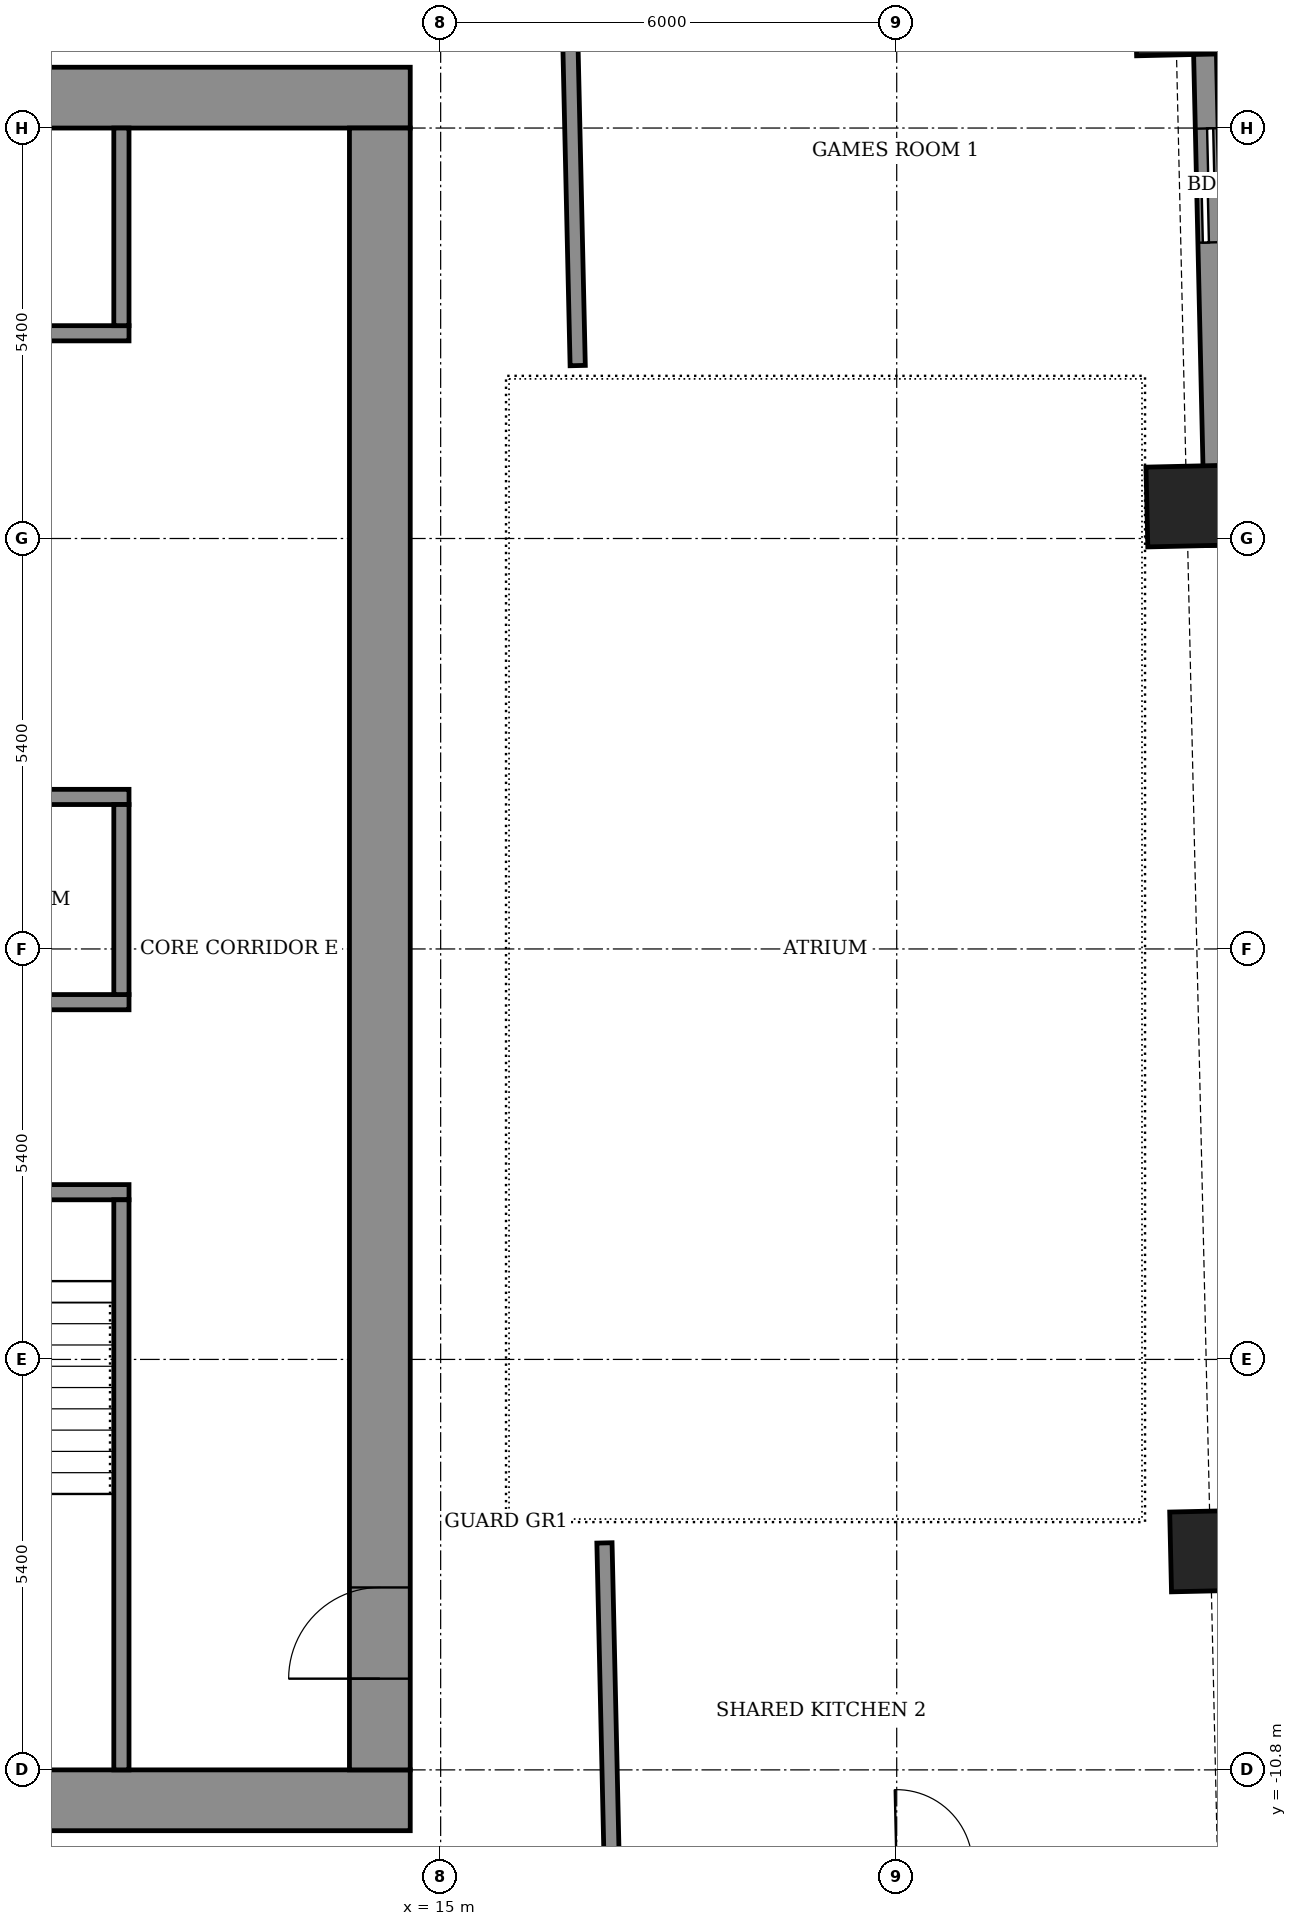
"""IFC4 building model, lengths in metres.
Left out: names, types, materials, properties, quantities, classifications, styles, units other than length and angle.
Written with IfcOpenShell. Run it as: python <this file> out.ifc"""

import sys

from ifc_helpers import new_model, si_unit, direction, frame, frame_2d, origin, origin_2d, place, context, subcontext, project, spatial, rectangle, extrude, element, fill, save


model = new_model("IFC4")
c1 = context("Model", 3, precision=1e-05, world=origin(), true_north=direction((0.0, 1.0)))
c2 = subcontext(c1, "Body", "Model", "MODEL_VIEW")
j1 = project(units=[si_unit("LENGTHUNIT", "METRE"), si_unit("PLANEANGLEUNIT", "RADIAN")], contexts=[c1])
p1 = place(None, origin())
s1 = spatial("IfcSite", under=j1, at=p1, CompositionType="ELEMENT")
p2 = place(p1, origin())
s2 = spatial("IfcBuilding", under=s1, at=p2, CompositionType="ELEMENT")
p3 = place(p2, frame((0.0, 0.0, 245.5)))
s3 = spatial("IfcBuildingStorey", under=s2, at=p3, CompositionType="ELEMENT", Elevation=245.5)
for number, where, z_axis, x_axis in (
    (1, (25.128, -7.921, -0.55), (0.0, 0.0, 1.0), (-0.023, 1.0, 0.0)),
    (2, (24.816, 5.826, -0.55), (0.0, 0.0, 1.0), (-0.023, 1.0, 0.0)),
    (3, (24.669, 12.287, -0.55), (0.0, 0.0, 1.0), (-0.023, 1.0, 0.0)),
):
    element("IfcColumn", number, at=place(p3, frame(where, z_axis=z_axis, x_axis=x_axis)), inside=s3, PredefinedType="COLUMN", context=c2, shape_type="SweptSolid", body=[
        extrude(rectangle(XDim=1.05, YDim=1.05, at=origin_2d()), origin(), (0.0, 0.0, 1.0), 3.6),
    ])
p4 = place(p3, frame((25.203, 5.31, 0.0), z_axis=(0.0, 0.0, 1.0), x_axis=(-0.022708061432, 0.999742138727, 0.0)))
e4 = element("IfcWall", 4, at=p4, inside=s3, PredefinedType="SOLIDWALL", context=c2, shape_type="SweptSolid", body=[
    extrude(rectangle(XDim=13.299, YDim=0.3, at=frame_2d((6.65, 0.0))), origin(), (0.0, 0.0, 1.0), 2.55),
])
p5 = place(p4, frame((3.986, 0.0, 0.0)))
e5 = element("IfcOpeningElement", 5, at=p5, cuts=e4, PredefinedType="OPENING", context=c2, shape_type="SweptSolid", body=[
    extrude(rectangle(XDim=1.5, YDim=2.4, at=frame_2d((0.75, 1.2))), frame((0.0, 0.16, 0.0), z_axis=(0.0, -1.0, 0.0), x_axis=(1.0, 0.0, 0.0)), (0.0, 0.0, 1.0), 0.32),
])
p6 = place(p4, frame((9.013, 0.0, 0.9)))
e6 = element("IfcOpeningElement", 6, at=p6, cuts=e4, PredefinedType="OPENING", context=c2, shape_type="SweptSolid", body=[
    extrude(rectangle(XDim=2.4, YDim=1.5, at=frame_2d((1.2, 0.75))), frame((0.0, 0.16, 0.0), z_axis=(0.0, -1.0, 0.0), x_axis=(1.0, 0.0, 0.0)), (0.0, 0.0, 1.0), 0.32),
])
p7 = place(p3, frame((17.253, -12.149, 0.0), z_axis=(0.0, 0.0, 1.0), x_axis=(-0.022578158225, 0.999745080894, 0.0)))
e7 = element("IfcWall", 7, at=p7, inside=s3, PredefinedType="PARTITIONING", context=c2, shape_type="SweptSolid", body=[
    extrude(rectangle(XDim=4.336, YDim=0.2, at=frame_2d((2.168, 0.0))), origin(), (0.0, 0.0, 1.0), 3.05),
])
p8 = place(p3, frame((16.803, 7.675, 0.0), z_axis=(0.0, 0.0, 1.0), x_axis=(-0.022667483124, 0.999743059595, 0.0)))
e8 = element("IfcWall", 8, at=p8, inside=s3, PredefinedType="PARTITIONING", context=c2, shape_type="SweptSolid", body=[
    extrude(rectangle(XDim=5.245, YDim=0.2, at=frame_2d((2.623, 0.0))), origin(), (0.0, 0.0, 1.0), 3.05),
])
for number, where, z_axis, x_axis in (
    (9, (-14.6, -11.2, 0.0), (0.0, 0.0, 1.0), (1.0, 0.0, 0.0)),
    (10, (-14.6, 11.2, 0.0), (0.0, 0.0, 1.0), (1.0, 0.0, 0.0)),
):
    element("IfcWall", number, at=place(p3, frame(where, z_axis=z_axis, x_axis=x_axis)), inside=s3, PredefinedType="SHEAR", context=c2, shape_type="SweptSolid", body=[
        extrude(rectangle(XDim=29.2, YDim=0.8, at=frame_2d((14.6, 0.0))), origin(), (0.0, 0.0, 1.0), 3.6),
    ])
p9 = place(p3, frame((14.2, -10.8, 0.0), z_axis=(0.0, 0.0, 1.0), x_axis=(0.0, 1.0, 0.0)))
e11 = element("IfcWall", 11, at=p9, inside=s3, PredefinedType="SHEAR", context=c2, shape_type="SweptSolid", body=[
    extrude(rectangle(XDim=21.6, YDim=0.8, at=frame_2d((10.8, 0.0))), origin(), (0.0, 0.0, 1.0), 3.6),
])
p10 = place(p9, frame((1.2, 0.0, 0.0)))
e12 = element("IfcOpeningElement", 12, at=p10, cuts=e11, PredefinedType="OPENING", context=c2, shape_type="SweptSolid", body=[
    extrude(rectangle(XDim=1.2, YDim=2.1, at=frame_2d((0.6, 1.05))), frame((0.0, 0.41, 0.0), z_axis=(0.0, -1.0, 0.0), x_axis=(1.0, 0.0, 0.0)), (0.0, 0.0, 1.0), 0.82),
])
p11 = place(p3, frame((-10.9, -3.2, 0.0), z_axis=(0.0, 0.0, 1.0), x_axis=(1.0, 0.0, 0.0)))
e13 = element("IfcWall", 13, at=p11, inside=s3, PredefinedType="SHEAR", context=c2, shape_type="SweptSolid", body=[
    extrude(rectangle(XDim=21.8, YDim=0.2, at=frame_2d((10.9, 0.0))), origin(), (0.0, 0.0, 1.0), 3.05),
])
p12 = place(p11, frame((1.075, 0.0, 0.0)))
e14 = element("IfcOpeningElement", 14, at=p12, cuts=e13, PredefinedType="OPENING", context=c2, shape_type="SweptSolid", body=[
    extrude(rectangle(XDim=1.1, YDim=2.1, at=frame_2d((0.55, 1.05))), frame((0.0, 0.11, 0.0), z_axis=(0.0, -1.0, 0.0), x_axis=(1.0, 0.0, 0.0)), (0.0, 0.0, 1.0), 0.22),
])
p13 = place(p11, frame((10.325, 0.0, 0.0)))
e15 = element("IfcOpeningElement", 15, at=p13, cuts=e13, PredefinedType="OPENING", context=c2, shape_type="SweptSolid", body=[
    extrude(rectangle(XDim=1.1, YDim=2.1, at=frame_2d((0.55, 1.05))), frame((0.0, 0.11, 0.0), z_axis=(0.0, -1.0, 0.0), x_axis=(1.0, 0.0, 0.0)), (0.0, 0.0, 1.0), 0.22),
])
p14 = place(p11, frame((19.625, 0.0, 0.0)))
e16 = element("IfcOpeningElement", 16, at=p14, cuts=e13, PredefinedType="OPENING", context=c2, shape_type="SweptSolid", body=[
    extrude(rectangle(XDim=1.1, YDim=2.1, at=frame_2d((0.55, 1.05))), frame((0.0, 0.11, 0.0), z_axis=(0.0, -1.0, 0.0), x_axis=(1.0, 0.0, 0.0)), (0.0, 0.0, 1.0), 0.22),
])
p15 = place(p11, frame((5.7, 0.0, 0.0)))
e17 = element("IfcOpeningElement", 17, at=p15, cuts=e13, PredefinedType="OPENING", context=c2, shape_type="SweptSolid", body=[
    extrude(rectangle(XDim=1.1, YDim=2.1, at=frame_2d((0.55, 1.05))), frame((0.0, 0.11, 0.0), z_axis=(0.0, -1.0, 0.0), x_axis=(1.0, 0.0, 0.0)), (0.0, 0.0, 1.0), 0.22),
])
p16 = place(p11, frame((14.975, 0.0, 0.0)))
e18 = element("IfcOpeningElement", 18, at=p16, cuts=e13, PredefinedType="OPENING", context=c2, shape_type="SweptSolid", body=[
    extrude(rectangle(XDim=1.1, YDim=2.1, at=frame_2d((0.55, 1.05))), frame((0.0, 0.11, 0.0), z_axis=(0.0, -1.0, 0.0), x_axis=(1.0, 0.0, 0.0)), (0.0, 0.0, 1.0), 0.22),
])
p17 = place(p3, frame((-10.9, -0.7, 0.0), z_axis=(0.0, 0.0, 1.0), x_axis=(1.0, 0.0, 0.0)))
e19 = element("IfcWall", 19, at=p17, inside=s3, PredefinedType="SHEAR", context=c2, shape_type="SweptSolid", body=[
    extrude(rectangle(XDim=21.8, YDim=0.2, at=frame_2d((10.9, 0.0))), origin(), (0.0, 0.0, 1.0), 3.05),
])
p18 = place(p3, frame((-10.9, 2.0, 0.0), z_axis=(0.0, 0.0, 1.0), x_axis=(1.0, 0.0, 0.0)))
e20 = element("IfcWall", 20, at=p18, inside=s3, PredefinedType="SHEAR", context=c2, shape_type="SweptSolid", body=[
    extrude(rectangle(XDim=21.8, YDim=0.2, at=frame_2d((10.9, 0.0))), origin(), (0.0, 0.0, 1.0), 3.05),
])
p19 = place(p18, frame((4.95, 0.0, 0.0)))
e21 = element("IfcOpeningElement", 21, at=p19, cuts=e20, PredefinedType="OPENING", context=c2, shape_type="SweptSolid", body=[
    extrude(rectangle(XDim=1.1, YDim=2.1, at=frame_2d((0.55, 1.05))), frame((0.0, 0.11, 0.0), z_axis=(0.0, -1.0, 0.0), x_axis=(1.0, 0.0, 0.0)), (0.0, 0.0, 1.0), 0.22),
])
p20 = place(p18, frame((7.65, 0.0, 0.0)))
e22 = element("IfcOpeningElement", 22, at=p20, cuts=e20, PredefinedType="OPENING", context=c2, shape_type="SweptSolid", body=[
    extrude(rectangle(XDim=1.1, YDim=2.1, at=frame_2d((0.55, 1.05))), frame((0.0, 0.11, 0.0), z_axis=(0.0, -1.0, 0.0), x_axis=(1.0, 0.0, 0.0)), (0.0, 0.0, 1.0), 0.22),
])
p21 = place(p18, frame((10.35, 0.0, 0.0)))
e23 = element("IfcOpeningElement", 23, at=p21, cuts=e20, PredefinedType="OPENING", context=c2, shape_type="SweptSolid", body=[
    extrude(rectangle(XDim=1.1, YDim=2.1, at=frame_2d((0.55, 1.05))), frame((0.0, 0.11, 0.0), z_axis=(0.0, -1.0, 0.0), x_axis=(1.0, 0.0, 0.0)), (0.0, 0.0, 1.0), 0.22),
])
p22 = place(p18, frame((1.675, 0.0, 0.0)))
e24 = element("IfcOpeningElement", 24, at=p22, cuts=e20, PredefinedType="OPENING", context=c2, shape_type="SweptSolid", body=[
    extrude(rectangle(XDim=0.9, YDim=2.1, at=frame_2d((0.45, 1.05))), frame((0.0, 0.11, 0.0), z_axis=(0.0, -1.0, 0.0), x_axis=(1.0, 0.0, 0.0)), (0.0, 0.0, 1.0), 0.22),
])
p23 = place(p18, frame((14.5, 0.0, 0.0)))
e25 = element("IfcOpeningElement", 25, at=p23, cuts=e20, PredefinedType="OPENING", context=c2, shape_type="SweptSolid", body=[
    extrude(rectangle(XDim=0.9, YDim=2.1, at=frame_2d((0.45, 1.05))), frame((0.0, 0.11, 0.0), z_axis=(0.0, -1.0, 0.0), x_axis=(1.0, 0.0, 0.0)), (0.0, 0.0, 1.0), 0.22),
])
p24 = place(p18, frame((19.225, 0.0, 0.0)))
e26 = element("IfcOpeningElement", 26, at=p24, cuts=e20, PredefinedType="OPENING", context=c2, shape_type="SweptSolid", body=[
    extrude(rectangle(XDim=0.9, YDim=2.1, at=frame_2d((0.45, 1.05))), frame((0.0, 0.11, 0.0), z_axis=(0.0, -1.0, 0.0), x_axis=(1.0, 0.0, 0.0)), (0.0, 0.0, 1.0), 0.22),
])
p25 = place(p3, frame((-10.9, 8.1, 0.0), z_axis=(0.0, 0.0, 1.0), x_axis=(1.0, 0.0, 0.0)))
e27 = element("IfcWall", 27, at=p25, inside=s3, PredefinedType="SHEAR", context=c2, shape_type="SweptSolid", body=[
    extrude(rectangle(XDim=21.8, YDim=0.2, at=frame_2d((10.9, 0.0))), origin(), (0.0, 0.0, 1.0), 3.05),
])
p26 = place(p25, frame((4.95, 0.0, 0.0)))
e28 = element("IfcOpeningElement", 28, at=p26, cuts=e27, PredefinedType="OPENING", context=c2, shape_type="SweptSolid", body=[
    extrude(rectangle(XDim=1.1, YDim=2.1, at=frame_2d((0.55, 1.05))), frame((0.0, 0.11, 0.0), z_axis=(0.0, -1.0, 0.0), x_axis=(1.0, 0.0, 0.0)), (0.0, 0.0, 1.0), 0.22),
])
p27 = place(p25, frame((7.65, 0.0, 0.0)))
e29 = element("IfcOpeningElement", 29, at=p27, cuts=e27, PredefinedType="OPENING", context=c2, shape_type="SweptSolid", body=[
    extrude(rectangle(XDim=1.1, YDim=2.1, at=frame_2d((0.55, 1.05))), frame((0.0, 0.11, 0.0), z_axis=(0.0, -1.0, 0.0), x_axis=(1.0, 0.0, 0.0)), (0.0, 0.0, 1.0), 0.22),
])
p28 = place(p25, frame((10.35, 0.0, 0.0)))
e30 = element("IfcOpeningElement", 30, at=p28, cuts=e27, PredefinedType="OPENING", context=c2, shape_type="SweptSolid", body=[
    extrude(rectangle(XDim=1.1, YDim=2.1, at=frame_2d((0.55, 1.05))), frame((0.0, 0.11, 0.0), z_axis=(0.0, -1.0, 0.0), x_axis=(1.0, 0.0, 0.0)), (0.0, 0.0, 1.0), 0.22),
])
p29 = place(p25, frame((1.675, 0.0, 0.0)))
e31 = element("IfcOpeningElement", 31, at=p29, cuts=e27, PredefinedType="OPENING", context=c2, shape_type="SweptSolid", body=[
    extrude(rectangle(XDim=0.9, YDim=2.1, at=frame_2d((0.45, 1.05))), frame((0.0, 0.11, 0.0), z_axis=(0.0, -1.0, 0.0), x_axis=(1.0, 0.0, 0.0)), (0.0, 0.0, 1.0), 0.22),
])
p30 = place(p25, frame((14.5, 0.0, 0.0)))
e32 = element("IfcOpeningElement", 32, at=p30, cuts=e27, PredefinedType="OPENING", context=c2, shape_type="SweptSolid", body=[
    extrude(rectangle(XDim=0.9, YDim=2.1, at=frame_2d((0.45, 1.05))), frame((0.0, 0.11, 0.0), z_axis=(0.0, -1.0, 0.0), x_axis=(1.0, 0.0, 0.0)), (0.0, 0.0, 1.0), 0.22),
])
p31 = place(p25, frame((19.225, 0.0, 0.0)))
e33 = element("IfcOpeningElement", 33, at=p31, cuts=e27, PredefinedType="OPENING", context=c2, shape_type="SweptSolid", body=[
    extrude(rectangle(XDim=0.9, YDim=2.1, at=frame_2d((0.45, 1.05))), frame((0.0, 0.11, 0.0), z_axis=(0.0, -1.0, 0.0), x_axis=(1.0, 0.0, 0.0)), (0.0, 0.0, 1.0), 0.22),
])
p32 = place(p3, frame((10.8, -10.8, 0.0), z_axis=(0.0, 0.0, 1.0), x_axis=(0.0, 1.0, 0.0)))
e34 = element("IfcWall", 34, at=p32, inside=s3, PredefinedType="SHEAR", context=c2, shape_type="SweptSolid", body=[
    extrude(rectangle(XDim=7.5, YDim=0.2, at=frame_2d((3.75, 0.0))), origin(), (0.0, 0.0, 1.0), 3.05),
])
p33 = place(p3, frame((10.8, -0.6, 0.0), z_axis=(0.0, 0.0, 1.0), x_axis=(0.0, 1.0, 0.0)))
e35 = element("IfcWall", 35, at=p33, inside=s3, PredefinedType="STANDARD", context=c2, shape_type="SweptSolid", body=[
    extrude(rectangle(XDim=2.5, YDim=0.2, at=frame_2d((1.25, 0.0))), origin(), (0.0, 0.0, 1.0), 3.05),
])
p34 = place(p3, frame((10.8, 8.2, 0.0), z_axis=(0.0, 0.0, 1.0), x_axis=(0.0, 1.0, 0.0)))
e36 = element("IfcWall", 36, at=p34, inside=s3, PredefinedType="STANDARD", context=c2, shape_type="SweptSolid", body=[
    extrude(rectangle(XDim=2.6, YDim=0.2, at=frame_2d((1.3, 0.0))), origin(), (0.0, 0.0, 1.0), 3.05),
])
p35 = place(p5, origin())
e37 = element("IfcDoor", 37, at=p35, inside=s3, OperationType="SLIDING_TO_LEFT", PredefinedType="DOOR", context=c2, shape_type="SweptSolid", body=[
    extrude(rectangle(XDim=1.5, YDim=2.4, at=frame_2d((0.75, 1.2))), frame((0.0, 0.025, 0.0), z_axis=(0.0, -1.0, 0.0), x_axis=(1.0, 0.0, 0.0)), (0.0, 0.0, 1.0), 0.05),
])
fill(e5, e37)
p36 = place(p10, origin())
e38 = element("IfcDoor", 38, at=p36, inside=s3, OperationType="DOUBLE_DOOR_SINGLE_SWING", PredefinedType="DOOR", context=c2, shape_type="SweptSolid", body=[
    extrude(rectangle(XDim=1.2, YDim=2.1, at=frame_2d((0.6, 1.05))), frame((0.0, 0.025, 0.0), z_axis=(0.0, -1.0, 0.0), x_axis=(1.0, 0.0, 0.0)), (0.0, 0.0, 1.0), 0.05),
])
fill(e12, e38)
save(model, sys.argv[1])
